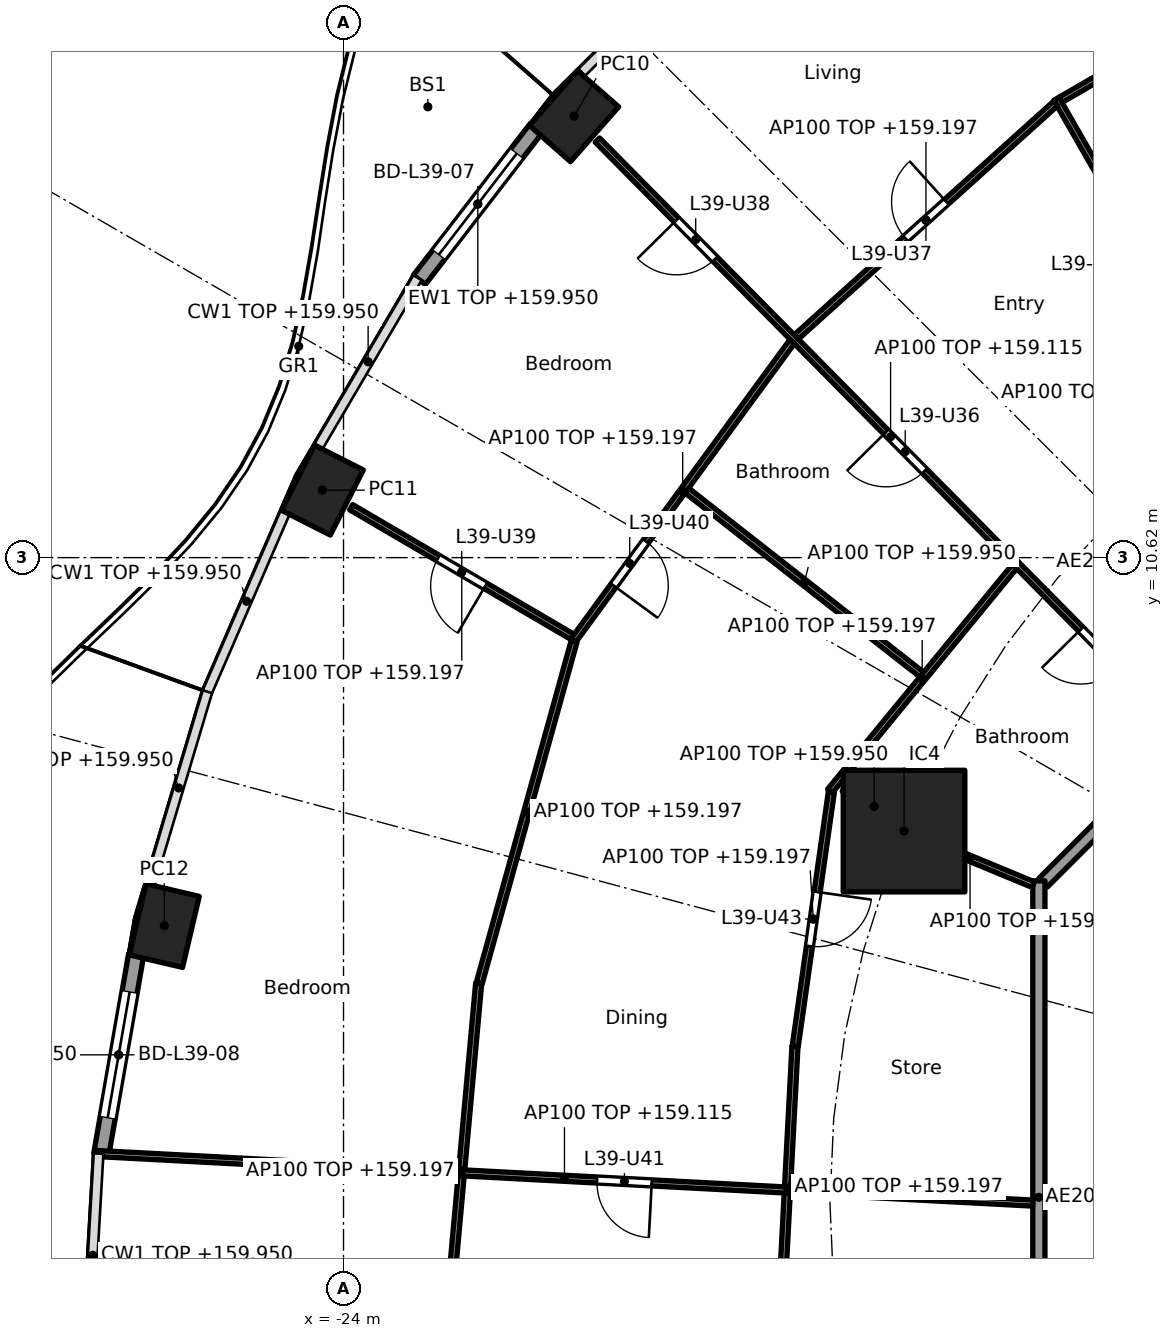
"""IFC4 building model, lengths in metres.
Left out: names, types, materials, properties, quantities, classifications, styles, units other than length and angle.
Written with IfcOpenShell. Run it as: python <this file> out.ifc"""

import sys

from ifc_helpers import new_model, si_unit, direction, frame, frame_2d, origin, origin_2d, place, context, subcontext, project, spatial, rectangle, hollow_rectangle, extrude, element, fill, save


model = new_model("IFC4")
c1 = context("Model", 3, precision=1e-05, world=origin(), true_north=direction((0.0, 1.0)))
c2 = subcontext(c1, "Body", "Model", "MODEL_VIEW")
j1 = project(units=[si_unit("LENGTHUNIT", "METRE"), si_unit("PLANEANGLEUNIT", "RADIAN")], contexts=[c1])
p1 = place(None, origin())
s1 = spatial("IfcSite", under=j1, at=p1, CompositionType="ELEMENT")
p2 = place(p1, origin())
s2 = spatial("IfcBuilding", under=s1, at=p2, CompositionType="ELEMENT")
p3 = place(p2, frame((0.0, 0.0, 156.6)))
s3 = spatial("IfcBuildingStorey", under=s2, at=p3, CompositionType="ELEMENT", Elevation=156.6)
for number, where, z_axis, x_axis in (
    (1, (-20.209, 17.88, 0.0), (0.0, 0.0, 1.0), (-0.66, -0.751, 0.0)),
    (2, (-24.347, 11.73, 0.0), (0.0, 0.0, 1.0), (-0.452, -0.892, 0.0)),
    (3, (-26.948, 4.568, 0.0), (0.0, 0.0, 1.0), (-0.229, -0.973, 0.0)),
):
    element("IfcColumn", number, at=place(p3, frame(where, z_axis=z_axis, x_axis=x_axis)), inside=s3, PredefinedType="COLUMN", context=c2, shape_type="SweptSolid", body=[
        extrude(hollow_rectangle(XDim=1.2, YDim=0.9, WallThickness=0.04, at=origin_2d()), origin(), (0.0, 0.0, 1.0), 3.7),
    ])
p4 = place(p3, frame((-14.782, 6.123, 0.0), z_axis=(0.0, 0.0, 1.0), x_axis=(1.0, 0.0, 0.0)))
e4 = element("IfcColumn", 4, at=p4, inside=s3, PredefinedType="COLUMN", context=c2, shape_type="SweptSolid", body=[
    extrude(rectangle(XDim=2.0, YDim=2.0, at=origin_2d()), origin(), (0.0, 0.0, 1.0), 3.7),
])
p5 = place(p3, frame((-22.753, 15.188, 0.0), z_axis=(0.0, 0.0, 1.0), x_axis=(0.610429847179, 0.792070326217, 0.0)))
e5 = element("IfcWall", 5, at=p5, inside=s3, PredefinedType="SOLIDWALL", context=c2, shape_type="SweptSolid", body=[
    extrude(rectangle(XDim=3.149, YDim=0.25, at=frame_2d((1.575, 0.0))), origin(), (0.0, 0.0, 1.0), 3.35),
])
p6 = place(p5, frame((0.525, 0.0, 0.0)))
e6 = element("IfcOpeningElement", 6, at=p6, cuts=e5, PredefinedType="OPENING", context=c2, shape_type="SweptSolid", body=[
    extrude(rectangle(XDim=2.1, YDim=2.4, at=frame_2d((1.05, 1.2))), frame((0.0, 0.135, 0.0), z_axis=(0.0, -1.0, 0.0), x_axis=(1.0, 0.0, 0.0)), (0.0, 0.0, 1.0), 0.27),
])
p7 = place(p3, frame((-27.985, 0.802, 0.0), z_axis=(0.0, 0.0, 1.0), x_axis=(0.172163521006, 0.985068384446, 0.0)))
e7 = element("IfcWall", 7, at=p7, inside=s3, PredefinedType="SOLIDWALL", context=c2, shape_type="SweptSolid", body=[
    extrude(rectangle(XDim=3.333, YDim=0.25, at=frame_2d((1.666, 0.0))), origin(), (0.0, 0.0, 1.0), 3.35),
])
p8 = place(p7, frame((0.616, 0.0, 0.0)))
e8 = element("IfcOpeningElement", 8, at=p8, cuts=e7, PredefinedType="OPENING", context=c2, shape_type="SweptSolid", body=[
    extrude(rectangle(XDim=2.1, YDim=2.4, at=frame_2d((1.05, 1.2))), frame((0.0, 0.135, 0.0), z_axis=(0.0, -1.0, 0.0), x_axis=(1.0, 0.0, 0.0)), (0.0, 0.0, 1.0), 0.27),
])
p9 = place(p3, frame((-5.275, 12.494, 0.0), z_axis=(0.0, 0.0, 1.0), x_axis=(-0.707106781187, -0.707106781187, 0.0)))
e9 = element("IfcWall", 9, at=p9, inside=s3, PredefinedType="PARTITIONING", context=c2, shape_type="SweptSolid", body=[
    extrude(rectangle(XDim=10.209, YDim=0.2, at=frame_2d((5.104, 0.0))), origin(), (0.0, 0.0, 1.0), 3.35),
])
p10 = place(p9, frame((4.604, 0.0, 0.0)))
e10 = element("IfcOpeningElement", 10, at=p10, cuts=e9, PredefinedType="OPENING", context=c2, shape_type="SweptSolid", body=[
    extrude(rectangle(XDim=1.0, YDim=2.1, at=frame_2d((0.5, 1.05))), frame((0.0, 0.11, 0.0), z_axis=(0.0, -1.0, 0.0), x_axis=(1.0, 0.0, 0.0)), (0.0, 0.0, 1.0), 0.22),
])
p11 = place(p3, frame((-12.565, 5.304, 0.0), z_axis=(0.0, 0.0, 1.0), x_axis=(0.0, -1.0, 0.0)))
e11 = element("IfcWall", 11, at=p11, inside=s3, PredefinedType="PARTITIONING", context=c2, shape_type="SweptSolid", body=[
    extrude(rectangle(XDim=10.409, YDim=0.2, at=frame_2d((5.205, 0.0))), origin(), (0.0, 0.0, 1.0), 3.35),
])
p12 = place(p3, frame((-7.586, 20.827, 0.0), z_axis=(0.0, 0.0, 1.0), x_axis=(-0.865093450578, -0.501610727325, 0.0)))
e12 = element("IfcWall", 12, at=p12, inside=s3, PredefinedType="PARTITIONING", context=c2, shape_type="SweptSolid", body=[
    extrude(rectangle(XDim=5.343, YDim=0.1, at=frame_2d((2.671, 0.0))), origin(), (0.0, 0.0, 1.0), 2.597),
])
p13 = place(p3, frame((-7.708, 10.198, 0.0), z_axis=(0.0, 0.0, 1.0), x_axis=(-0.497449462689, 0.867492957937, 0.0)))
e13 = element("IfcWall", 13, at=p13, inside=s3, PredefinedType="PARTITIONING", context=c2, shape_type="SweptSolid", body=[
    extrude(rectangle(XDim=9.185, YDim=0.1, at=frame_2d((4.592, 0.0))), origin(), (0.0, 0.0, 1.0), 2.515),
])
p14 = place(p13, frame((1.511, 0.0, 0.0)))
e14 = element("IfcOpeningElement", 14, at=p14, cuts=e13, PredefinedType="OPENING", context=c2, shape_type="SweptSolid", body=[
    extrude(rectangle(XDim=0.9, YDim=2.1, at=frame_2d((0.45, 1.05))), frame((0.0, 0.06, 0.0), z_axis=(0.0, -1.0, 0.0), x_axis=(1.0, 0.0, 0.0)), (0.0, 0.0, 1.0), 0.12),
])
p15 = place(p13, frame((6.078, 0.0, 0.0)))
e15 = element("IfcOpeningElement", 15, at=p15, cuts=e13, PredefinedType="OPENING", context=c2, shape_type="SweptSolid", body=[
    extrude(rectangle(XDim=0.9, YDim=2.1, at=frame_2d((0.45, 1.05))), frame((0.0, 0.06, 0.0), z_axis=(0.0, -1.0, 0.0), x_axis=(1.0, 0.0, 0.0)), (0.0, 0.0, 1.0), 0.12),
])
p16 = place(p3, frame((-12.289, 18.089, 0.0), z_axis=(0.0, 0.0, 1.0), x_axis=(-0.743146066164, -0.669129228435, 0.0)))
e16 = element("IfcWall", 16, at=p16, inside=s3, PredefinedType="PARTITIONING", context=c2, shape_type="SweptSolid", body=[
    extrude(rectangle(XDim=5.739, YDim=0.1, at=frame_2d((2.87, 0.0))), origin(), (0.0, 0.0, 1.0), 2.597),
])
p17 = place(p16, frame((2.42, 0.0, 0.0)))
e17 = element("IfcOpeningElement", 17, at=p17, cuts=e16, PredefinedType="OPENING", context=c2, shape_type="SweptSolid", body=[
    extrude(rectangle(XDim=0.9, YDim=2.1, at=frame_2d((0.45, 1.05))), frame((0.0, 0.06, 0.0), z_axis=(0.0, -1.0, 0.0), x_axis=(1.0, 0.0, 0.0)), (0.0, 0.0, 1.0), 0.12),
])
p18 = place(p3, frame((-10.182, 7.729, 0.0), z_axis=(0.0, 0.0, 1.0), x_axis=(-0.702930219229, 0.7112588185, 0.0)))
e18 = element("IfcWall", 18, at=p18, inside=s3, PredefinedType="PARTITIONING", context=c2, shape_type="SweptSolid", body=[
    extrude(rectangle(XDim=13.719, YDim=0.1, at=frame_2d((6.859, 0.0))), origin(), (0.0, 0.0, 1.0), 2.515),
])
p19 = place(p18, frame((1.507, 0.0, 0.0)))
e19 = element("IfcOpeningElement", 19, at=p19, cuts=e18, PredefinedType="OPENING", context=c2, shape_type="SweptSolid", body=[
    extrude(rectangle(XDim=0.9, YDim=2.1, at=frame_2d((0.45, 1.05))), frame((0.0, 0.06, 0.0), z_axis=(0.0, -1.0, 0.0), x_axis=(1.0, 0.0, 0.0)), (0.0, 0.0, 1.0), 0.12),
])
p20 = place(p18, frame((6.067, 0.0, 0.0)))
e20 = element("IfcOpeningElement", 20, at=p20, cuts=e18, PredefinedType="OPENING", context=c2, shape_type="SweptSolid", body=[
    extrude(rectangle(XDim=0.9, YDim=2.1, at=frame_2d((0.45, 1.05))), frame((0.0, 0.06, 0.0), z_axis=(0.0, -1.0, 0.0), x_axis=(1.0, 0.0, 0.0)), (0.0, 0.0, 1.0), 0.12),
])
p21 = place(p18, frame((10.969, 0.0, 0.0)))
e21 = element("IfcOpeningElement", 21, at=p21, cuts=e18, PredefinedType="OPENING", context=c2, shape_type="SweptSolid", body=[
    extrude(rectangle(XDim=0.9, YDim=2.1, at=frame_2d((0.45, 1.05))), frame((0.0, 0.06, 0.0), z_axis=(0.0, -1.0, 0.0), x_axis=(1.0, 0.0, 0.0)), (0.0, 0.0, 1.0), 0.12),
])
p22 = place(p3, frame((-12.965, 10.475, 0.0), z_axis=(0.0, 0.0, 1.0), x_axis=(-0.634932102074, -0.772567942485, 0.0)))
e22 = element("IfcWall", 22, at=p22, inside=s3, PredefinedType="PARTITIONING", context=c2, shape_type="SweptSolid", body=[
    extrude(rectangle(XDim=4.782, YDim=0.1, at=frame_2d((2.391, 0.0))), origin(), (0.0, 0.0, 1.0), 2.597),
])
p23 = place(p3, frame((-16.621, 14.174, 0.0), z_axis=(0.0, 0.0, 1.0), x_axis=(-0.590672767272, -0.806911198338, 0.0)))
e23 = element("IfcWall", 23, at=p23, inside=s3, PredefinedType="PARTITIONING", context=c2, shape_type="SweptSolid", body=[
    extrude(rectangle(XDim=6.099, YDim=0.1, at=frame_2d((3.05, 0.0))), origin(), (0.0, 0.0, 1.0), 2.597),
])
p24 = place(p23, frame((4.074, 0.0, 0.0)))
e24 = element("IfcOpeningElement", 24, at=p24, cuts=e23, PredefinedType="OPENING", context=c2, shape_type="SweptSolid", body=[
    extrude(rectangle(XDim=0.9, YDim=2.1, at=frame_2d((0.45, 1.05))), frame((0.0, 0.06, 0.0), z_axis=(0.0, -1.0, 0.0), x_axis=(1.0, 0.0, 0.0)), (0.0, 0.0, 1.0), 0.12),
])
p25 = place(p3, frame((-14.491, 8.697, 0.0), z_axis=(0.0, 0.0, 1.0), x_axis=(-0.787139479951, 0.616775031193, 0.0)))
e25 = element("IfcWall", 25, at=p25, inside=s3, PredefinedType="PARTITIONING", context=c2, shape_type="SweptSolid", body=[
    extrude(rectangle(XDim=4.907, YDim=0.1, at=frame_2d((2.453, 0.0))), origin(), (0.0, 0.0, 1.0), 3.35),
])
p26 = place(p3, frame((-12.657, 5.243, 0.0), z_axis=(0.0, 0.0, 1.0), x_axis=(-0.923864733477, 0.382719158442, 0.0)))
e26 = element("IfcWall", 26, at=p26, inside=s3, PredefinedType="PARTITIONING", context=c2, shape_type="SweptSolid", body=[
    extrude(rectangle(XDim=2.25, YDim=0.1, at=frame_2d((1.125, 0.0))), origin(), (0.0, 0.0, 1.0), 3.35),
])
p27 = place(p3, frame((-15.977, 6.769, 0.0), z_axis=(0.0, 0.0, 1.0), x_axis=(-0.140693592547, -0.990053186963, 0.0)))
e27 = element("IfcWall", 27, at=p27, inside=s3, PredefinedType="PARTITIONING", context=c2, shape_type="SweptSolid", body=[
    extrude(rectangle(XDim=4.227, YDim=0.1, at=frame_2d((2.114, 0.0))), origin(), (0.0, 0.0, 1.0), 2.597),
])
p28 = place(p27, frame((1.664, 0.0, 0.0)))
e28 = element("IfcOpeningElement", 28, at=p28, cuts=e27, PredefinedType="OPENING", context=c2, shape_type="SweptSolid", body=[
    extrude(rectangle(XDim=0.9, YDim=2.1, at=frame_2d((0.45, 1.05))), frame((0.0, 0.06, 0.0), z_axis=(0.0, -1.0, 0.0), x_axis=(1.0, 0.0, 0.0)), (0.0, 0.0, 1.0), 0.12),
])
p29 = place(p3, frame((-20.237, 9.319, 0.0), z_axis=(0.0, 0.0, 1.0), x_axis=(-0.862867843769, 0.505429603593, 0.0)))
e29 = element("IfcWall", 29, at=p29, inside=s3, PredefinedType="PARTITIONING", context=c2, shape_type="SweptSolid", body=[
    extrude(rectangle(XDim=4.215, YDim=0.1, at=frame_2d((2.107, 0.0))), origin(), (0.0, 0.0, 1.0), 2.597),
])
p30 = place(p29, frame((1.658, 0.0, 0.0)))
e30 = element("IfcOpeningElement", 30, at=p30, cuts=e29, PredefinedType="OPENING", context=c2, shape_type="SweptSolid", body=[
    extrude(rectangle(XDim=0.9, YDim=2.1, at=frame_2d((0.45, 1.05))), frame((0.0, 0.06, 0.0), z_axis=(0.0, -1.0, 0.0), x_axis=(1.0, 0.0, 0.0)), (0.0, 0.0, 1.0), 0.12),
])
p31 = place(p3, frame((-20.207, 9.245, 0.0), z_axis=(0.0, 0.0, 1.0), x_axis=(-0.267400122135, -0.963585582438, 0.0)))
e31 = element("IfcWall", 31, at=p31, inside=s3, PredefinedType="PARTITIONING", context=c2, shape_type="SweptSolid", body=[
    extrude(rectangle(XDim=5.838, YDim=0.1, at=frame_2d((2.919, 0.0))), origin(), (0.0, 0.0, 1.0), 2.597),
])
p32 = place(p3, frame((-16.576, 2.585, 0.0), z_axis=(0.0, 0.0, 1.0), x_axis=(-0.052509224895, -0.998620439056, 0.0)))
e32 = element("IfcWall", 32, at=p32, inside=s3, PredefinedType="PARTITIONING", context=c2, shape_type="SweptSolid", body=[
    extrude(rectangle(XDim=4.649, YDim=0.1, at=frame_2d((2.325, 0.0))), origin(), (0.0, 0.0, 1.0), 2.597),
])
p33 = place(p3, frame((-21.777, 3.621, 0.0), z_axis=(0.0, 0.0, 1.0), x_axis=(-0.090606877484, -0.995886737412, 0.0)))
e33 = element("IfcWall", 33, at=p33, inside=s3, PredefinedType="PARTITIONING", context=c2, shape_type="SweptSolid", body=[
    extrude(rectangle(XDim=6.189, YDim=0.1, at=frame_2d((3.095, 0.0))), origin(), (0.0, 0.0, 1.0), 2.597),
])
p34 = place(p3, frame((-12.665, 0.005, 0.0), z_axis=(0.0, 0.0, 1.0), x_axis=(-0.998599229025, 0.052911055468, 0.0)))
e34 = element("IfcWall", 34, at=p34, inside=s3, PredefinedType="PARTITIONING", context=c2, shape_type="SweptSolid", body=[
    extrude(rectangle(XDim=15.425, YDim=0.1, at=frame_2d((7.713, 0.0))), origin(), (0.0, 0.0, 1.0), 2.515),
])
p35 = place(p34, frame((6.276, 0.0, 0.0)))
e35 = element("IfcOpeningElement", 35, at=p35, cuts=e34, PredefinedType="OPENING", context=c2, shape_type="SweptSolid", body=[
    extrude(rectangle(XDim=0.9, YDim=2.1, at=frame_2d((0.45, 1.05))), frame((0.0, 0.06, 0.0), z_axis=(0.0, -1.0, 0.0), x_axis=(1.0, 0.0, 0.0)), (0.0, 0.0, 1.0), 0.12),
])
p36 = place(p3, frame((-14.772, 6.233, 0.0), z_axis=(0.0, 0.0, 1.0), x_axis=(-0.862824428323, 0.50550371501, 0.0)))
e36 = element("IfcWall", 36, at=p36, inside=s3, PredefinedType="PARTITIONING", context=c2, shape_type="SweptSolid", body=[
    extrude(rectangle(XDim=1.162, YDim=0.1, at=frame_2d((0.581, 0.0))), origin(), (0.0, 0.0, 1.0), 3.35),
])
p37 = place(p6, origin())
e37 = element("IfcDoor", 37, at=p37, inside=s3, OperationType="SLIDING_TO_LEFT", PredefinedType="DOOR", context=c2, shape_type="SweptSolid", body=[
    extrude(rectangle(XDim=2.1, YDim=2.4, at=frame_2d((1.05, 1.2))), frame((0.0, 0.025, 0.0), z_axis=(0.0, -1.0, 0.0), x_axis=(1.0, 0.0, 0.0)), (0.0, 0.0, 1.0), 0.05),
])
fill(e6, e37)
p38 = place(p8, origin())
e38 = element("IfcDoor", 38, at=p38, inside=s3, OperationType="SLIDING_TO_LEFT", PredefinedType="DOOR", context=c2, shape_type="SweptSolid", body=[
    extrude(rectangle(XDim=2.1, YDim=2.4, at=frame_2d((1.05, 1.2))), frame((0.0, 0.025, 0.0), z_axis=(0.0, -1.0, 0.0), x_axis=(1.0, 0.0, 0.0)), (0.0, 0.0, 1.0), 0.05),
])
fill(e8, e38)
p39 = place(p19, origin())
e39 = element("IfcDoor", 39, at=p39, inside=s3, OperationType="SINGLE_SWING_RIGHT", PredefinedType="DOOR", context=c2, shape_type="SweptSolid", body=[
    extrude(rectangle(XDim=0.9, YDim=2.1, at=frame_2d((0.45, 1.05))), frame((0.0, 0.025, 0.0), z_axis=(0.0, -1.0, 0.0), x_axis=(1.0, 0.0, 0.0)), (0.0, 0.0, 1.0), 0.05),
])
fill(e19, e39)
p40 = place(p20, origin())
e40 = element("IfcDoor", 40, at=p40, inside=s3, OperationType="SINGLE_SWING_RIGHT", PredefinedType="DOOR", context=c2, shape_type="SweptSolid", body=[
    extrude(rectangle(XDim=0.9, YDim=2.1, at=frame_2d((0.45, 1.05))), frame((0.0, 0.025, 0.0), z_axis=(0.0, -1.0, 0.0), x_axis=(1.0, 0.0, 0.0)), (0.0, 0.0, 1.0), 0.05),
])
fill(e20, e40)
p41 = place(p17, frame((0.9, 0.0, 0.0), x_axis=(-1.0, 0.0, 0.0)))
e41 = element("IfcDoor", 41, at=p41, inside=s3, OperationType="SINGLE_SWING_RIGHT", PredefinedType="DOOR", context=c2, shape_type="SweptSolid", body=[
    extrude(rectangle(XDim=0.9, YDim=2.1, at=frame_2d((0.45, 1.05))), frame((0.0, 0.025, 0.0), z_axis=(0.0, -1.0, 0.0), x_axis=(1.0, 0.0, 0.0)), (0.0, 0.0, 1.0), 0.05),
])
fill(e17, e41)
p42 = place(p21, origin())
e42 = element("IfcDoor", 42, at=p42, inside=s3, OperationType="SINGLE_SWING_RIGHT", PredefinedType="DOOR", context=c2, shape_type="SweptSolid", body=[
    extrude(rectangle(XDim=0.9, YDim=2.1, at=frame_2d((0.45, 1.05))), frame((0.0, 0.025, 0.0), z_axis=(0.0, -1.0, 0.0), x_axis=(1.0, 0.0, 0.0)), (0.0, 0.0, 1.0), 0.05),
])
fill(e21, e42)
p43 = place(p30, origin())
e43 = element("IfcDoor", 43, at=p43, inside=s3, OperationType="SINGLE_SWING_LEFT", PredefinedType="DOOR", context=c2, shape_type="SweptSolid", body=[
    extrude(rectangle(XDim=0.9, YDim=2.1, at=frame_2d((0.45, 1.05))), frame((0.0, 0.025, 0.0), z_axis=(0.0, -1.0, 0.0), x_axis=(1.0, 0.0, 0.0)), (0.0, 0.0, 1.0), 0.05),
])
fill(e30, e43)
p44 = place(p24, origin())
e44 = element("IfcDoor", 44, at=p44, inside=s3, OperationType="SINGLE_SWING_RIGHT", PredefinedType="DOOR", context=c2, shape_type="SweptSolid", body=[
    extrude(rectangle(XDim=0.9, YDim=2.1, at=frame_2d((0.45, 1.05))), frame((0.0, 0.025, 0.0), z_axis=(0.0, -1.0, 0.0), x_axis=(1.0, 0.0, 0.0)), (0.0, 0.0, 1.0), 0.05),
])
fill(e24, e44)
p45 = place(p35, origin())
e45 = element("IfcDoor", 45, at=p45, inside=s3, OperationType="SINGLE_SWING_LEFT", PredefinedType="DOOR", context=c2, shape_type="SweptSolid", body=[
    extrude(rectangle(XDim=0.9, YDim=2.1, at=frame_2d((0.45, 1.05))), frame((0.0, 0.025, 0.0), z_axis=(0.0, -1.0, 0.0), x_axis=(1.0, 0.0, 0.0)), (0.0, 0.0, 1.0), 0.05),
])
fill(e35, e45)
p46 = place(p28, origin())
e46 = element("IfcDoor", 46, at=p46, inside=s3, OperationType="SINGLE_SWING_LEFT", PredefinedType="DOOR", context=c2, shape_type="SweptSolid", body=[
    extrude(rectangle(XDim=0.9, YDim=2.1, at=frame_2d((0.45, 1.05))), frame((0.0, 0.025, 0.0), z_axis=(0.0, -1.0, 0.0), x_axis=(1.0, 0.0, 0.0)), (0.0, 0.0, 1.0), 0.05),
])
fill(e28, e46)
save(model, sys.argv[1])
